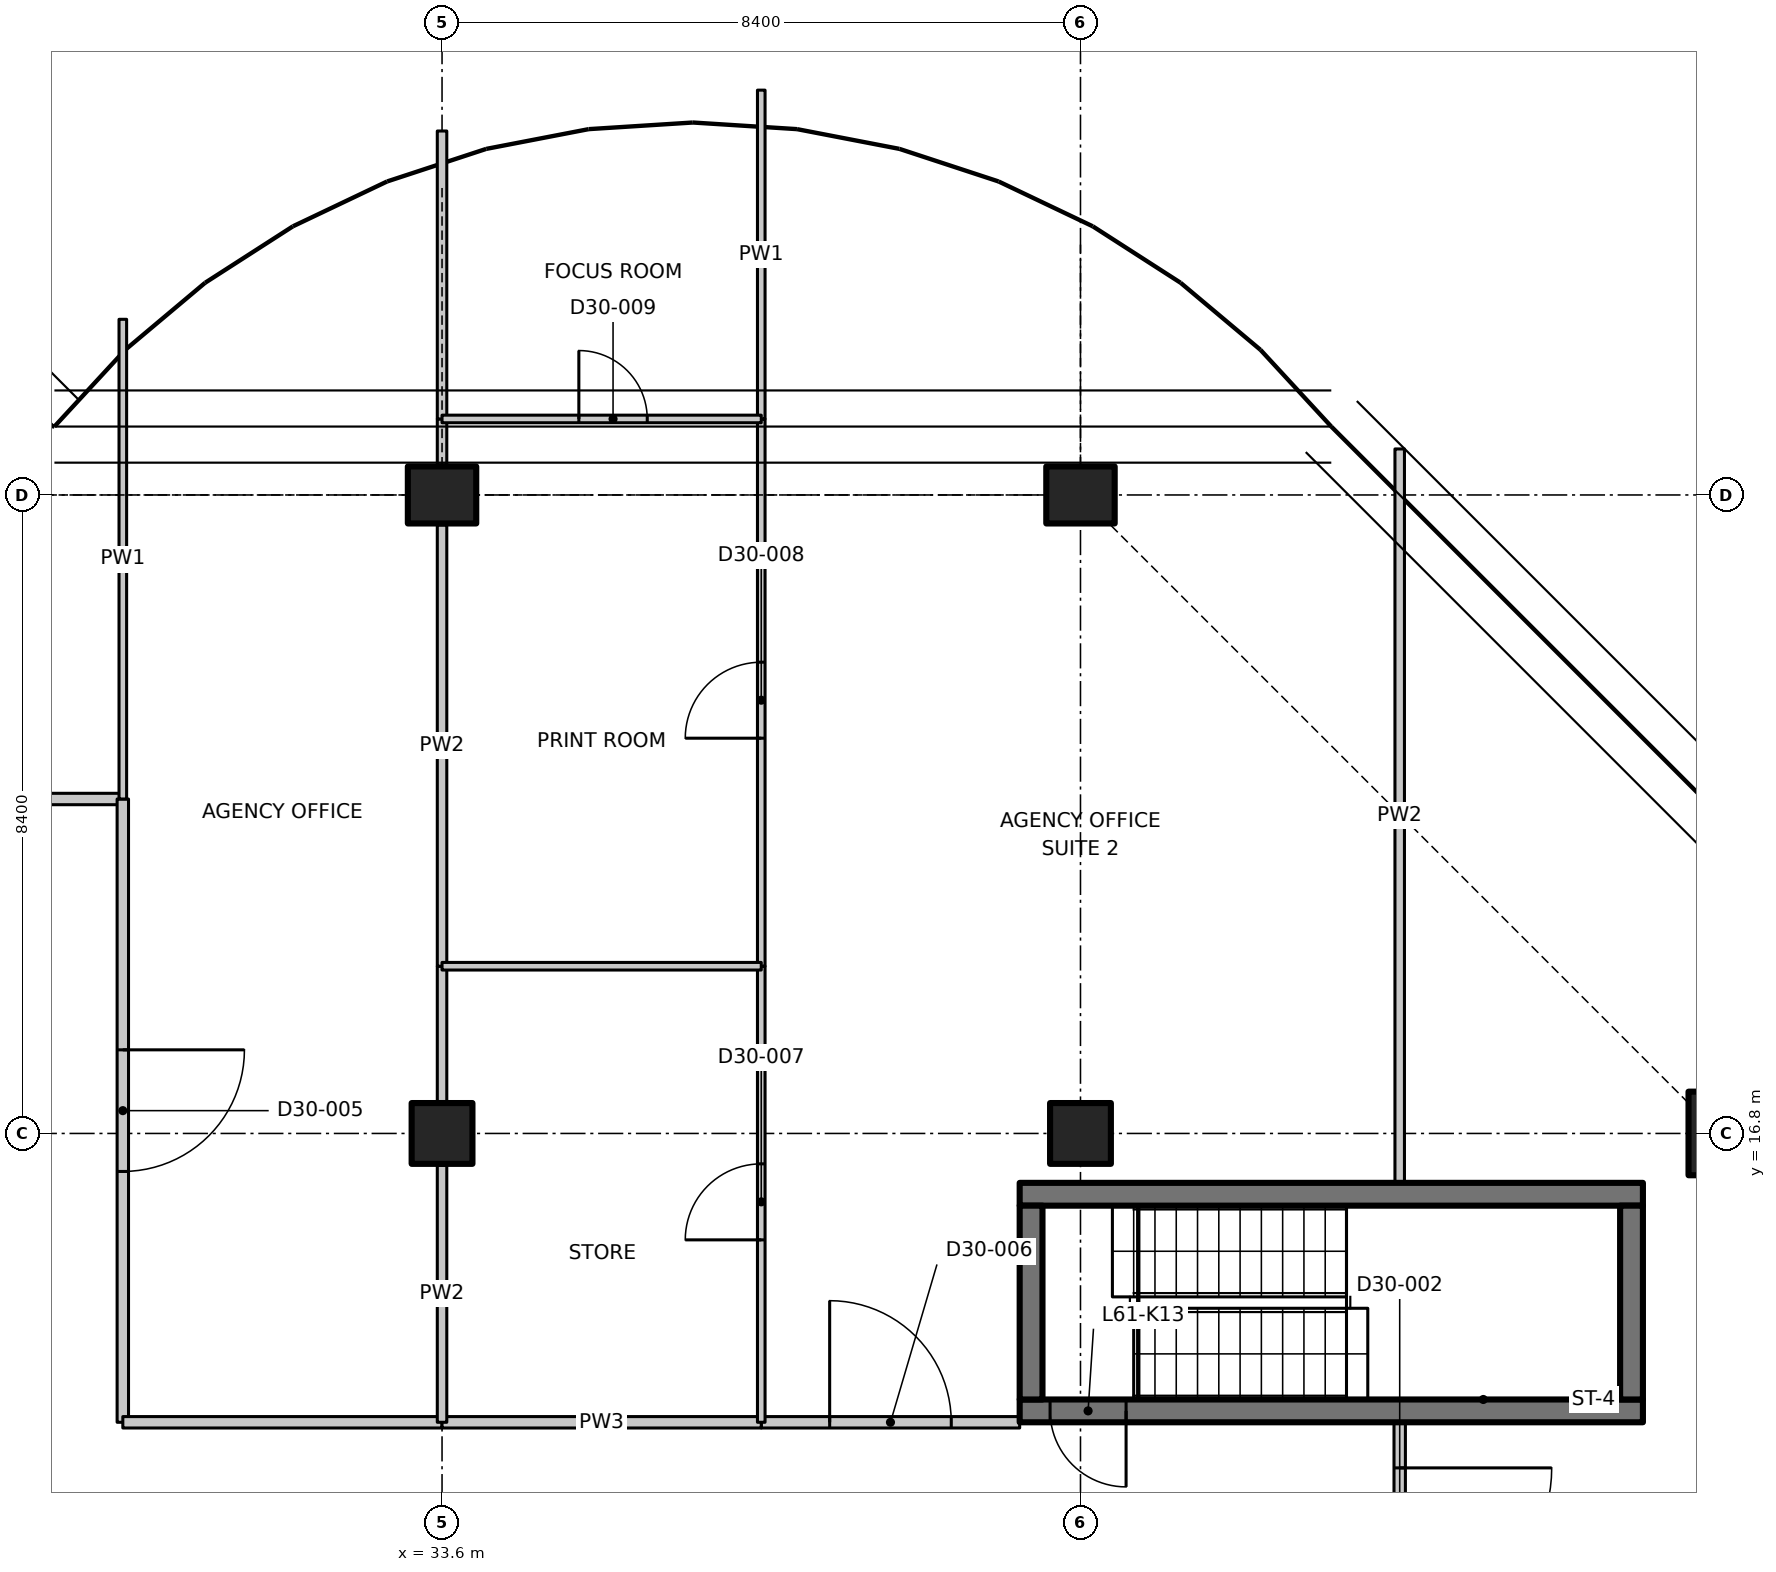
"""IFC4 building model, lengths in metres.
Left out: names, types, materials, properties, quantities, classifications, styles, units other than length and angle.
Written with IfcOpenShell. Run it as: python <this file> out.ifc"""

import sys

from ifc_helpers import new_model, si_unit, direction, frame, frame_2d, origin, origin_2d, place, context, subcontext, project, spatial, polyline, rectangle, outline, extrude, element, fill, save


model = new_model("IFC4")
c1 = context("Model", 3, precision=1e-05, world=origin(), true_north=direction((0.0, 1.0)))
c2 = subcontext(c1, "Body", "Model", "MODEL_VIEW")
j1 = project(units=[si_unit("LENGTHUNIT", "METRE"), si_unit("PLANEANGLEUNIT", "RADIAN")], contexts=[c1])
p1 = place(None, origin())
s1 = spatial("IfcSite", under=j1, at=p1, CompositionType="ELEMENT")
p2 = place(p1, origin())
s2 = spatial("IfcBuilding", under=s1, at=p2, CompositionType="ELEMENT")
p3 = place(p2, frame((0.0, 0.0, 240.9)))
s3 = spatial("IfcBuildingStorey", under=s2, at=p3, CompositionType="ELEMENT", Elevation=240.9)
p4 = place(p3, frame((33.6, 16.8, 0.0), z_axis=(0.0, 0.0, 1.0), x_axis=(1.0, 0.0, 0.0)))
e1 = element("IfcColumn", 1, at=p4, inside=s3, PredefinedType="COLUMN", context=c2, shape_type="SweptSolid", body=[
    extrude(rectangle(XDim=0.8, YDim=0.8, at=origin_2d()), origin(), (0.0, 0.0, 1.0), 3.35),
])
p5 = place(p3, frame((33.6, 25.2, 0.0), z_axis=(0.0, 0.0, 1.0), x_axis=(0.0, 1.0, 0.0)))
e2 = element("IfcColumn", 2, at=p5, inside=s3, PredefinedType="COLUMN", context=c2, shape_type="SweptSolid", body=[
    extrude(rectangle(XDim=0.75, YDim=0.9, at=origin_2d()), origin(), (0.0, 0.0, 1.0), 3.35),
])
p6 = place(p3, frame((42.0, 16.8, 0.0), z_axis=(0.0, 0.0, 1.0), x_axis=(1.0, 0.0, 0.0)))
e3 = element("IfcColumn", 3, at=p6, inside=s3, PredefinedType="COLUMN", context=c2, shape_type="SweptSolid", body=[
    extrude(rectangle(XDim=0.8, YDim=0.8, at=origin_2d()), origin(), (0.0, 0.0, 1.0), 3.35),
])
p7 = place(p3, frame((42.0, 25.2, 0.0), z_axis=(0.0, 0.0, 1.0), x_axis=(0.0, 1.0, 0.0)))
e4 = element("IfcColumn", 4, at=p7, inside=s3, PredefinedType="COLUMN", context=c2, shape_type="SweptSolid", body=[
    extrude(rectangle(XDim=0.75, YDim=0.9, at=origin_2d()), origin(), (0.0, 0.0, 1.0), 3.35),
])
p8 = place(p3, frame((50.4, 16.8, 0.0), z_axis=(0.0, 0.0, 1.0), x_axis=(1.0, 0.0, 0.0)))
e5 = element("IfcColumn", 5, at=p8, inside=s3, PredefinedType="COLUMN", context=c2, shape_type="SweptSolid", body=[
    extrude(rectangle(XDim=0.8, YDim=1.1, at=origin_2d()), origin(), (0.0, 0.0, 1.0), 3.35),
])
p9 = place(p3, frame((49.4, 13.15, 0.0), z_axis=(0.0, 0.0, 1.0), x_axis=(-1.0, 0.0, 0.0)))
e6 = element("IfcWall", 6, at=p9, inside=s3, PredefinedType="SHEAR", context=c2, shape_type="SweptSolid", body=[
    extrude(rectangle(XDim=8.2, YDim=0.3, at=frame_2d((4.1, 0.0))), origin(), (0.0, 0.0, 1.0), 3.35),
])
p10 = place(p9, frame((6.8, 0.0, 0.0)))
e7 = element("IfcOpeningElement", 7, at=p10, cuts=e6, PredefinedType="OPENING", context=c2, shape_type="SweptSolid", body=[
    extrude(rectangle(XDim=1.0, YDim=2.1, at=frame_2d((0.5, 1.05))), frame((0.0, 0.16, 0.0), z_axis=(0.0, -1.0, 0.0), x_axis=(1.0, 0.0, 0.0)), (0.0, 0.0, 1.0), 0.32),
])
p11 = place(p3, frame((41.2, 16.0, 0.0), z_axis=(0.0, 0.0, 1.0), x_axis=(1.0, 0.0, 0.0)))
e8 = element("IfcWall", 8, at=p11, inside=s3, PredefinedType="SHEAR", context=c2, shape_type="SweptSolid", body=[
    extrude(rectangle(XDim=8.2, YDim=0.3, at=frame_2d((4.1, 0.0))), origin(), (0.0, 0.0, 1.0), 3.35),
])
for number, where, z_axis, x_axis in (
    (9, (41.35, 13.3, 0.0), (0.0, 0.0, 1.0), (0.0, 1.0, 0.0)),
    (10, (49.25, 13.3, 0.0), (0.0, 0.0, 1.0), (0.0, 1.0, 0.0)),
):
    element("IfcWall", number, at=place(p3, frame(where, z_axis=z_axis, x_axis=x_axis)), inside=s3, PredefinedType="SHEAR", context=c2, shape_type="SweptSolid", body=[
        extrude(rectangle(XDim=2.55, YDim=0.3, at=frame_2d((1.275, 0.0))), origin(), (0.0, 0.0, 1.0), 3.35),
    ])
p12 = place(p3, frame((25.2, 21.2, 0.0), z_axis=(0.0, 0.0, 1.0), x_axis=(1.0, 0.0, 0.0)))
e11 = element("IfcWall", 11, at=p12, inside=s3, PredefinedType="PARTITIONING", context=c2, shape_type="SweptSolid", body=[
    extrude(rectangle(XDim=4.2, YDim=0.15, at=frame_2d((2.1, 0.0))), origin(), (0.0, 0.0, 1.0), 3.33),
])
p13 = place(p12, frame((1.5, 0.0, 0.0)))
e12 = element("IfcOpeningElement", 12, at=p13, cuts=e11, PredefinedType="OPENING", context=c2, shape_type="SweptSolid", body=[
    extrude(rectangle(XDim=1.0, YDim=2.1, at=frame_2d((0.5, 1.05))), frame((0.0, 0.085, 0.0), z_axis=(0.0, -1.0, 0.0), x_axis=(1.0, 0.0, 0.0)), (0.0, 0.0, 1.0), 0.17),
])
p14 = place(p3, frame((29.4, 21.2, 0.0), z_axis=(0.0, 0.0, 1.0), x_axis=(0.0, -1.0, 0.0)))
e13 = element("IfcWall", 13, at=p14, inside=s3, PredefinedType="PARTITIONING", context=c2, shape_type="SweptSolid", body=[
    extrude(rectangle(XDim=8.2, YDim=0.15, at=frame_2d((4.1, 0.0))), origin(), (0.0, 0.0, 1.0), 3.33),
])
p15 = place(p14, frame((3.3, 0.0, 0.0)))
e14 = element("IfcOpeningElement", 14, at=p15, cuts=e13, PredefinedType="OPENING", context=c2, shape_type="SweptSolid", body=[
    extrude(rectangle(XDim=1.6, YDim=2.1, at=frame_2d((0.8, 1.05))), frame((0.0, 0.085, 0.0), z_axis=(0.0, -1.0, 0.0), x_axis=(1.0, 0.0, 0.0)), (0.0, 0.0, 1.0), 0.17),
])
p16 = place(p3, frame((29.4, 27.511, 0.0), z_axis=(0.0, 0.0, 1.0), x_axis=(0.0, -1.0, 0.0)))
e15 = element("IfcWall", 15, at=p16, inside=s3, PredefinedType="PARTITIONING", context=c2, shape_type="SweptSolid", body=[
    extrude(outline(polyline([(0.0, 0.0), (6.311, 0.0), (6.311, 3.33), (2.761, 3.33), (2.759, 2.98), (1.863, 2.98), (1.861, 3.33), (0.236, 3.33), (0.0, 3.33), (0.0, 0.0)])), frame((0.0, 0.05, 0.0), z_axis=(0.0, -1.0, 0.0), x_axis=(1.0, 0.0, 0.0)), (0.0, 0.0, 1.0), 0.1),
])
p17 = place(p3, frame((46.2, 13.0, 0.0), z_axis=(0.0, 0.0, 1.0), x_axis=(0.0, -1.0, 0.0)))
e16 = element("IfcWall", 16, at=p17, inside=s3, PredefinedType="PARTITIONING", context=c2, shape_type="SweptSolid", body=[
    extrude(rectangle(XDim=3.4, YDim=0.15, at=frame_2d((1.7, 0.0))), origin(), (0.0, 0.0, 1.0), 3.33),
])
p18 = place(p17, frame((0.6, 0.0, 0.0)))
e17 = element("IfcOpeningElement", 17, at=p18, cuts=e16, PredefinedType="OPENING", context=c2, shape_type="SweptSolid", body=[
    extrude(rectangle(XDim=2.0, YDim=2.4, at=frame_2d((1.0, 1.2))), frame((0.0, 0.085, 0.0), z_axis=(0.0, -1.0, 0.0), x_axis=(1.0, 0.0, 0.0)), (0.0, 0.0, 1.0), 0.17),
])
p19 = place(p3, frame((29.4, 13.0, 0.0), z_axis=(0.0, 0.0, 1.0), x_axis=(1.0, 0.0, 0.0)))
e18 = element("IfcWall", 18, at=p19, inside=s3, PredefinedType="PARTITIONING", context=c2, shape_type="SweptSolid", body=[
    extrude(rectangle(XDim=4.2, YDim=0.15, at=frame_2d((2.1, 0.0))), origin(), (0.0, 0.0, 1.0), 3.33),
])
p20 = place(p3, frame((37.8, 13.0, 0.0), z_axis=(0.0, 0.0, 1.0), x_axis=(1.0, 0.0, 0.0)))
e19 = element("IfcWall", 19, at=p20, inside=s3, PredefinedType="PARTITIONING", context=c2, shape_type="SweptSolid", body=[
    extrude(rectangle(XDim=3.4, YDim=0.15, at=frame_2d((1.7, 0.0))), origin(), (0.0, 0.0, 1.0), 3.33),
])
p21 = place(p20, frame((0.9, 0.0, 0.0)))
e20 = element("IfcOpeningElement", 20, at=p21, cuts=e19, PredefinedType="OPENING", context=c2, shape_type="SweptSolid", body=[
    extrude(rectangle(XDim=1.6, YDim=2.1, at=frame_2d((0.8, 1.05))), frame((0.0, 0.085, 0.0), z_axis=(0.0, -1.0, 0.0), x_axis=(1.0, 0.0, 0.0)), (0.0, 0.0, 1.0), 0.17),
])
p22 = place(p3, frame((33.6, 13.0, 0.0), z_axis=(0.0, 0.0, 1.0), x_axis=(1.0, 0.0, 0.0)))
e21 = element("IfcWall", 21, at=p22, inside=s3, PredefinedType="PARTITIONING", context=c2, shape_type="SweptSolid", body=[
    extrude(rectangle(XDim=4.2, YDim=0.15, at=frame_2d((2.1, 0.0))), origin(), (0.0, 0.0, 1.0), 3.33),
])
p23 = place(p3, frame((46.2, 16.15, 0.0), z_axis=(0.0, 0.0, 1.0), x_axis=(0.0, 1.0, 0.0)))
e22 = element("IfcWall", 22, at=p23, inside=s3, PredefinedType="PARTITIONING", context=c2, shape_type="SweptSolid", body=[
    extrude(outline(polyline([(0.0, 0.0), (9.656, 0.0), (9.656, 3.33), (9.25, 3.33), (5.528, 3.33), (5.526, 2.98), (4.174, 2.98), (4.172, 3.33), (0.0, 3.33), (0.0, 0.0)])), frame((0.0, 0.062, 0.0), z_axis=(0.0, -1.0, 0.0), x_axis=(1.0, 0.0, 0.0)), (0.0, 0.0, 1.0), 0.125),
])
p24 = place(p3, frame((33.6, 19.0, 0.0), z_axis=(0.0, 0.0, 1.0), x_axis=(0.0, -1.0, 0.0)))
e23 = element("IfcWall", 23, at=p24, inside=s3, PredefinedType="PARTITIONING", context=c2, shape_type="SweptSolid", body=[
    extrude(rectangle(XDim=1.78, YDim=0.125, at=frame_2d((0.89, 0.0))), origin(), (0.0, 0.0, 1.0), 3.33),
])
p25 = place(p3, frame((33.6, 16.38, 0.0), z_axis=(0.0, 0.0, 1.0), x_axis=(0.0, -1.0, 0.0)))
e24 = element("IfcWall", 24, at=p25, inside=s3, PredefinedType="PARTITIONING", context=c2, shape_type="SweptSolid", body=[
    extrude(rectangle(XDim=3.38, YDim=0.125, at=frame_2d((1.69, 0.0))), origin(), (0.0, 0.0, 1.0), 3.33),
])
p26 = place(p3, frame((33.6, 26.2, 0.0), z_axis=(0.0, 0.0, 1.0), x_axis=(0.0, -1.0, 0.0)))
e25 = element("IfcWall", 25, at=p26, inside=s3, PredefinedType="PARTITIONING", context=c2, shape_type="SweptSolid", body=[
    extrude(rectangle(XDim=0.605, YDim=0.125, at=frame_2d((0.302, 0.0))), origin(), (0.0, 0.0, 1.0), 2.98),
])
p27 = place(p3, frame((33.6, 24.805, 0.0), z_axis=(0.0, 0.0, 1.0), x_axis=(0.0, -1.0, 0.0)))
e26 = element("IfcWall", 26, at=p27, inside=s3, PredefinedType="PARTITIONING", context=c2, shape_type="SweptSolid", body=[
    extrude(outline(polyline([(0.0, 0.0), (5.805, 0.0), (5.805, 3.33), (0.055, 3.33), (0.053, 2.98), (0.0, 2.98), (0.0, 0.0)])), frame((0.0, 0.062, 0.0), z_axis=(0.0, -1.0, 0.0), x_axis=(1.0, 0.0, 0.0)), (0.0, 0.0, 1.0), 0.125),
])
p28 = place(p3, frame((33.6, 29.988, 0.0), z_axis=(0.0, 0.0, 1.0), x_axis=(0.0, -1.0, 0.0)))
e27 = element("IfcWall", 27, at=p28, inside=s3, PredefinedType="PARTITIONING", context=c2, shape_type="SweptSolid", body=[
    extrude(rectangle(XDim=3.788, YDim=0.125, at=frame_2d((1.894, 0.0))), origin(), (0.0, 0.0, 1.0), 2.98),
])
p29 = place(p3, frame((37.8, 13.0, 0.0), z_axis=(0.0, 0.0, 1.0), x_axis=(0.0, 1.0, 0.0)))
e28 = element("IfcWall", 28, at=p29, inside=s3, PredefinedType="PARTITIONING", context=c2, shape_type="SweptSolid", body=[
    extrude(rectangle(XDim=6.0, YDim=0.1, at=frame_2d((3.0, 0.0))), origin(), (0.0, 0.0, 1.0), 3.33),
])
p30 = place(p29, frame((2.4, 0.0, 0.0)))
e29 = element("IfcOpeningElement", 29, at=p30, cuts=e28, PredefinedType="OPENING", context=c2, shape_type="SweptSolid", body=[
    extrude(rectangle(XDim=1.0, YDim=2.1, at=frame_2d((0.5, 1.05))), frame((0.0, 0.06, 0.0), z_axis=(0.0, -1.0, 0.0), x_axis=(1.0, 0.0, 0.0)), (0.0, 0.0, 1.0), 0.12),
])
p31 = place(p3, frame((37.8, 19.0, 0.0), z_axis=(0.0, 0.0, 1.0), x_axis=(0.0, 1.0, 0.0)))
e30 = element("IfcWall", 30, at=p31, inside=s3, PredefinedType="PARTITIONING", context=c2, shape_type="SweptSolid", body=[
    extrude(outline(polyline([(0.0, 0.0), (7.2, 0.0), (7.2, 3.33), (6.65, 3.33), (6.648, 2.98), (5.752, 2.98), (5.75, 3.33), (0.0, 3.33), (0.0, 0.0)])), frame((0.0, 0.05, 0.0), z_axis=(0.0, -1.0, 0.0), x_axis=(1.0, 0.0, 0.0)), (0.0, 0.0, 1.0), 0.1),
])
p32 = place(p31, frame((3.0, 0.0, 0.0)))
e31 = element("IfcOpeningElement", 31, at=p32, cuts=e30, PredefinedType="OPENING", context=c2, shape_type="SweptSolid", body=[
    extrude(rectangle(XDim=1.0, YDim=2.1, at=frame_2d((0.5, 1.05))), frame((0.0, 0.06, 0.0), z_axis=(0.0, -1.0, 0.0), x_axis=(1.0, 0.0, 0.0)), (0.0, 0.0, 1.0), 0.12),
])
p33 = place(p3, frame((37.8, 26.2, 0.0), z_axis=(0.0, 0.0, 1.0), x_axis=(0.0, 1.0, 0.0)))
e32 = element("IfcWall", 32, at=p33, inside=s3, PredefinedType="PARTITIONING", context=c2, shape_type="SweptSolid", body=[
    extrude(rectangle(XDim=4.326, YDim=0.1, at=frame_2d((2.163, 0.0))), origin(), (0.0, 0.0, 1.0), 3.33),
])
p34 = place(p3, frame((33.6, 19.0, 0.0), z_axis=(0.0, 0.0, 1.0), x_axis=(1.0, 0.0, 0.0)))
e33 = element("IfcWall", 33, at=p34, inside=s3, PredefinedType="PARTITIONING", context=c2, shape_type="SweptSolid", body=[
    extrude(rectangle(XDim=4.2, YDim=0.1, at=frame_2d((2.1, 0.0))), origin(), (0.0, 0.0, 1.0), 3.33),
])
p35 = place(p3, frame((33.6, 26.2, 0.0), z_axis=(0.0, 0.0, 1.0), x_axis=(1.0, 0.0, 0.0)))
e34 = element("IfcWall", 34, at=p35, inside=s3, PredefinedType="PARTITIONING", context=c2, shape_type="SweptSolid", body=[
    extrude(rectangle(XDim=4.2, YDim=0.1, at=frame_2d((2.1, 0.0))), origin(), (0.0, 0.0, 1.0), 2.98),
])
p36 = place(p35, frame((1.8, 0.0, 0.0)))
e35 = element("IfcOpeningElement", 35, at=p36, cuts=e34, PredefinedType="OPENING", context=c2, shape_type="SweptSolid", body=[
    extrude(rectangle(XDim=0.9, YDim=2.1, at=frame_2d((0.45, 1.05))), frame((0.0, 0.06, 0.0), z_axis=(0.0, -1.0, 0.0), x_axis=(1.0, 0.0, 0.0)), (0.0, 0.0, 1.0), 0.12),
])
p37 = place(p10, origin())
e36 = element("IfcDoor", 36, at=p37, inside=s3, OperationType="SINGLE_SWING_RIGHT", PredefinedType="DOOR", context=c2, shape_type="SweptSolid", body=[
    extrude(rectangle(XDim=1.0, YDim=2.1, at=frame_2d((0.5, 1.05))), frame((0.0, 0.025, 0.0), z_axis=(0.0, -1.0, 0.0), x_axis=(1.0, 0.0, 0.0)), (0.0, 0.0, 1.0), 0.05),
])
fill(e7, e36)
p38 = place(p18, origin())
e37 = element("IfcDoor", 37, at=p38, inside=s3, OperationType="DOUBLE_DOOR_SINGLE_SWING", PredefinedType="DOOR", context=c2, shape_type="SweptSolid", body=[
    extrude(rectangle(XDim=2.0, YDim=2.4, at=frame_2d((1.0, 1.2))), frame((0.0, 0.025, 0.0), z_axis=(0.0, -1.0, 0.0), x_axis=(1.0, 0.0, 0.0)), (0.0, 0.0, 1.0), 0.05),
])
fill(e17, e37)
p39 = place(p15, origin())
e38 = element("IfcDoor", 38, at=p39, inside=s3, OperationType="DOUBLE_DOOR_SINGLE_SWING", PredefinedType="DOOR", context=c2, shape_type="SweptSolid", body=[
    extrude(rectangle(XDim=1.6, YDim=2.1, at=frame_2d((0.8, 1.05))), frame((0.0, 0.025, 0.0), z_axis=(0.0, -1.0, 0.0), x_axis=(1.0, 0.0, 0.0)), (0.0, 0.0, 1.0), 0.05),
])
fill(e14, e38)
p40 = place(p21, origin())
e39 = element("IfcDoor", 39, at=p40, inside=s3, OperationType="DOUBLE_DOOR_SINGLE_SWING", PredefinedType="DOOR", context=c2, shape_type="SweptSolid", body=[
    extrude(rectangle(XDim=1.6, YDim=2.1, at=frame_2d((0.8, 1.05))), frame((0.0, 0.025, 0.0), z_axis=(0.0, -1.0, 0.0), x_axis=(1.0, 0.0, 0.0)), (0.0, 0.0, 1.0), 0.05),
])
fill(e20, e39)
p41 = place(p30, origin())
e40 = element("IfcDoor", 40, at=p41, inside=s3, OperationType="SINGLE_SWING_LEFT", PredefinedType="DOOR", context=c2, shape_type="SweptSolid", body=[
    extrude(rectangle(XDim=1.0, YDim=2.1, at=frame_2d((0.5, 1.05))), frame((0.0, 0.025, 0.0), z_axis=(0.0, -1.0, 0.0), x_axis=(1.0, 0.0, 0.0)), (0.0, 0.0, 1.0), 0.05),
])
fill(e29, e40)
p42 = place(p32, origin())
e41 = element("IfcDoor", 41, at=p42, inside=s3, OperationType="SINGLE_SWING_LEFT", PredefinedType="DOOR", context=c2, shape_type="SweptSolid", body=[
    extrude(rectangle(XDim=1.0, YDim=2.1, at=frame_2d((0.5, 1.05))), frame((0.0, 0.025, 0.0), z_axis=(0.0, -1.0, 0.0), x_axis=(1.0, 0.0, 0.0)), (0.0, 0.0, 1.0), 0.05),
])
fill(e31, e41)
p43 = place(p36, origin())
e42 = element("IfcDoor", 42, at=p43, inside=s3, OperationType="SINGLE_SWING_LEFT", PredefinedType="DOOR", context=c2, shape_type="SweptSolid", body=[
    extrude(rectangle(XDim=0.9, YDim=2.1, at=frame_2d((0.45, 1.05))), frame((0.0, 0.025, 0.0), z_axis=(0.0, -1.0, 0.0), x_axis=(1.0, 0.0, 0.0)), (0.0, 0.0, 1.0), 0.05),
])
fill(e35, e42)
save(model, sys.argv[1])
